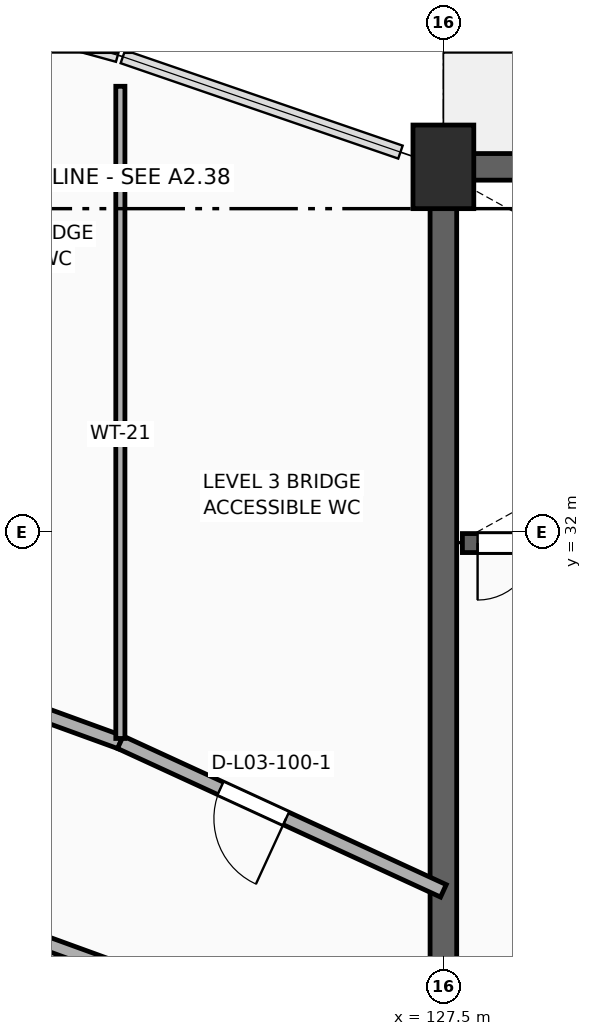
"""IFC4 building model, lengths in metres.
Left out: names, types, materials, properties, quantities, classifications, styles, units other than length and angle.
Written with IfcOpenShell. Run it as: python <this file> out.ifc"""

import sys

from ifc_helpers import new_model, si_unit, direction, frame, frame_2d, origin, origin_2d, place, context, subcontext, project, spatial, rectangle, extrude, element, fill, save


model = new_model("IFC4")
c1 = context("Model", 3, precision=1e-05, world=origin(), true_north=direction((0.0, 1.0)))
c2 = subcontext(c1, "Body", "Model", "MODEL_VIEW")
j1 = project(units=[si_unit("LENGTHUNIT", "METRE"), si_unit("PLANEANGLEUNIT", "RADIAN")], contexts=[c1])
p1 = place(None, origin())
s1 = spatial("IfcSite", under=j1, at=p1, CompositionType="ELEMENT")
p2 = place(p1, origin())
s2 = spatial("IfcBuilding", under=s1, at=p2, CompositionType="ELEMENT")
p3 = place(p2, frame((0.0, 0.0, 15.0)))
s3 = spatial("IfcBuildingStorey", under=s2, at=p3, CompositionType="ELEMENT", Elevation=15.0)
p4 = place(p3, frame((127.5, 24.0, 0.0), z_axis=(0.0, 0.0, 1.0), x_axis=(0.0, 1.0, 0.0)))
e1 = element("IfcWall", 1, at=p4, inside=s3, PredefinedType="SHEAR", context=c2, shape_type="SweptSolid", body=[
    extrude(rectangle(XDim=12.8, YDim=0.35, at=frame_2d((6.4, 0.0))), origin(), (0.0, 0.0, 1.0), 4.64),
])
p5 = place(p3, frame((127.675, 36.8, 0.0), z_axis=(0.0, 0.0, 1.0), x_axis=(1.0, 0.0, 0.0)))
e2 = element("IfcWall", 2, at=p5, inside=s3, PredefinedType="SHEAR", context=c2, shape_type="SweptSolid", body=[
    extrude(rectangle(XDim=8.65, YDim=0.35, at=frame_2d((4.325, 0.0))), origin(), (0.0, 0.0, 1.0), 4.64),
])
p6 = place(p3, frame((127.75, 31.85, 0.0), z_axis=(0.0, 0.0, 1.0), x_axis=(1.0, 0.0, 0.0)))
e3 = element("IfcWall", 3, at=p6, inside=s3, PredefinedType="STANDARD", context=c2, shape_type="SweptSolid", body=[
    extrude(rectangle(XDim=8.5, YDim=0.25, at=frame_2d((4.25, 0.0))), origin(), (0.0, 0.0, 1.0), 4.64),
])
p7 = place(p6, frame((0.2, 0.0, 0.0)))
e4 = element("IfcOpeningElement", 4, at=p7, cuts=e3, PredefinedType="OPENING", context=c2, shape_type="SweptSolid", body=[
    extrude(rectangle(XDim=1.5, YDim=2.2, at=frame_2d((0.75, 1.1))), frame((0.0, 0.137, 0.0), z_axis=(0.0, -1.0, 0.0), x_axis=(1.0, 0.0, 0.0)), (0.0, 0.0, 1.0), 0.274),
])
p8 = place(p3, frame((127.5, 36.8, 0.0), z_axis=(0.0, 0.0, 1.0), x_axis=(1.0, 0.0, 0.0)))
e5 = element("IfcColumn", 5, at=p8, inside=s3, PredefinedType="COLUMN", context=c2, shape_type="SweptSolid", body=[
    extrude(rectangle(XDim=0.8, YDim=1.1, at=origin_2d()), origin(), (0.0, 0.0, 1.0), 4.54),
])
p9 = place(p3, frame((119.0, 27.774, 0.0), z_axis=(0.0, 0.0, 1.0), x_axis=(0.939831249065, -0.341639024821, 0.0)))
e6 = element("IfcWall", 6, at=p9, inside=s3, PredefinedType="PARTITIONING", context=c2, shape_type="SweptSolid", body=[
    extrude(rectangle(XDim=4.522, YDim=0.18, at=frame_2d((2.261, 0.0))), origin(), (0.0, 0.0, 1.0), 3.668),
])
p10 = place(p3, frame((119.0, 30.774, 0.0), z_axis=(0.0, 0.0, 1.0), x_axis=(0.939831249065, -0.341639024821, 0.0)))
e7 = element("IfcWall", 7, at=p10, inside=s3, PredefinedType="PARTITIONING", context=c2, shape_type="SweptSolid", body=[
    extrude(rectangle(XDim=4.522, YDim=0.18, at=frame_2d((2.261, 0.0))), origin(), (0.0, 0.0, 1.0), 3.668),
])
p11 = place(p10, frame((1.45, 0.0, 0.0)))
e8 = element("IfcOpeningElement", 8, at=p11, cuts=e7, PredefinedType="OPENING", context=c2, shape_type="SweptSolid", body=[
    extrude(rectangle(XDim=0.9, YDim=2.15, at=frame_2d((0.45, 1.075))), frame((0.0, 0.102, 0.0), z_axis=(0.0, -1.0, 0.0), x_axis=(1.0, 0.0, 0.0)), (0.0, 0.0, 1.0), 0.204),
])
p12 = place(p3, frame((123.25, 29.229, 0.0), z_axis=(0.0, 0.0, 1.0), x_axis=(0.908484112169, -0.417919391673, 0.0)))
e9 = element("IfcWall", 9, at=p12, inside=s3, PredefinedType="PARTITIONING", context=c2, shape_type="SweptSolid", body=[
    extrude(rectangle(XDim=4.678, YDim=0.18, at=frame_2d((2.339, 0.0))), origin(), (0.0, 0.0, 1.0), 3.668),
])
p13 = place(p12, frame((1.45, 0.0, 0.0)))
e10 = element("IfcOpeningElement", 10, at=p13, cuts=e9, PredefinedType="OPENING", context=c2, shape_type="SweptSolid", body=[
    extrude(rectangle(XDim=0.95, YDim=2.15, at=frame_2d((0.475, 1.075))), frame((0.0, 0.102, 0.0), z_axis=(0.0, -1.0, 0.0), x_axis=(1.0, 0.0, 0.0)), (0.0, 0.0, 1.0), 0.204),
])
p14 = place(p3, frame((123.25, 29.279, 0.0), z_axis=(0.0, 0.0, 1.0), x_axis=(0.0, 1.0, 0.0)))
e11 = element("IfcWall", 11, at=p14, inside=s3, PredefinedType="PARTITIONING", context=c2, shape_type="SweptSolid", body=[
    extrude(rectangle(XDim=8.581, YDim=0.12, at=frame_2d((4.291, 0.0))), origin(), (0.0, 0.0, 1.0), 3.668),
])
p15 = place(p7, frame((1.5, 0.0, 0.0), z_axis=(0.0, 0.0, 1.0), x_axis=(-1.0, 0.0, 0.0)))
e12 = element("IfcDoor", 12, at=p15, inside=s3, OperationType="DOUBLE_DOOR_SINGLE_SWING", PredefinedType="DOOR", context=c2, shape_type="SweptSolid", body=[
    extrude(rectangle(XDim=1.5, YDim=2.2, at=frame_2d((0.75, 1.1))), frame((0.0, 0.025, 0.0), z_axis=(0.0, -1.0, 0.0), x_axis=(1.0, 0.0, 0.0)), (0.0, 0.0, 1.0), 0.05),
])
fill(e4, e12)
p16 = place(p13, frame((0.95, 0.0, 0.0), z_axis=(0.0, 0.0, 1.0), x_axis=(-1.0, 0.0, 0.0)))
e13 = element("IfcDoor", 13, at=p16, inside=s3, OperationType="SINGLE_SWING_RIGHT", PredefinedType="DOOR", context=c2, shape_type="SweptSolid", body=[
    extrude(rectangle(XDim=0.95, YDim=2.15, at=frame_2d((0.475, 1.075))), frame((0.0, 0.025, 0.0), z_axis=(0.0, -1.0, 0.0), x_axis=(1.0, 0.0, 0.0)), (0.0, 0.0, 1.0), 0.05),
])
fill(e10, e13)
save(model, sys.argv[1])
